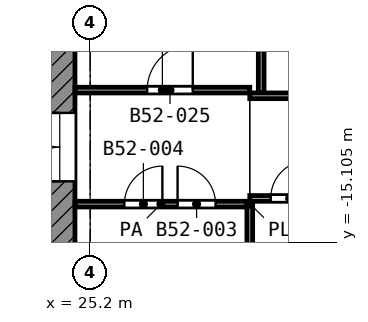
"""IFC4 building model, lengths in metres.
Left out: names, types, materials, properties, quantities, classifications, styles, units other than length and angle.
Written with IfcOpenShell. Run it as: python <this file> out.ifc"""

import sys

from ifc_helpers import new_model, si_unit, direction, frame, frame_2d, origin, place, context, subcontext, project, spatial, rectangle, extrude, element, fill, save


model = new_model("IFC4")
c1 = context("Model", 3, precision=1e-05, world=origin(), true_north=direction((0.0, 1.0)))
c2 = subcontext(c1, "Body", "Model", "MODEL_VIEW")
j1 = project(units=[si_unit("LENGTHUNIT", "METRE"), si_unit("PLANEANGLEUNIT", "RADIAN")], contexts=[c1])
p1 = place(None, origin())
s1 = spatial("IfcSite", under=j1, at=p1, CompositionType="ELEMENT")
p2 = place(p1, origin())
s2 = spatial("IfcBuilding", under=s1, at=p2, CompositionType="ELEMENT")
p3 = place(p2, frame((0.0, 0.0, 226.4)))
s3 = spatial("IfcBuildingStorey", under=s2, at=p3, CompositionType="ELEMENT", Elevation=226.4)
p4 = place(p3, frame((24.4, -24.0, 0.0), z_axis=(0.0, 0.0, 1.0), x_axis=(0.0, 1.0, 0.0)))
e1 = element("IfcWall", 1, at=p4, inside=s3, PredefinedType="SHEAR", context=c2, shape_type="SweptSolid", body=[
    extrude(rectangle(XDim=18.6, YDim=0.8, at=frame_2d((9.3, 0.0))), origin(), (0.0, 0.0, 1.0), 3.6),
])
p5 = place(p4, frame((10.5, 0.0, 0.0)))
e2 = element("IfcOpeningElement", 2, at=p5, cuts=e1, PredefinedType="OPENING", context=c2, shape_type="SweptSolid", body=[
    extrude(rectangle(XDim=1.8, YDim=2.1, at=frame_2d((0.9, 1.05))), frame((0.0, 0.41, 0.0), z_axis=(0.0, -1.0, 0.0), x_axis=(1.0, 0.0, 0.0)), (0.0, 0.0, 1.0), 0.82),
])
p6 = place(p3, frame((29.4, -14.147, 0.0), z_axis=(0.0, 0.0, 1.0), x_axis=(0.0, 1.0, 0.0)))
e3 = element("IfcWall", 3, at=p6, inside=s3, PredefinedType="PARTITIONING", context=c2, shape_type="SweptSolid", body=[
    extrude(rectangle(XDim=0.12, YDim=0.1, at=frame_2d((0.06, 0.0))), origin(), (0.0, 0.0, 1.0), 3.6),
])
p7 = place(p3, frame((24.8, -14.1, 0.0), z_axis=(0.0, 0.0, 1.0), x_axis=(1.0, 0.0, 0.0)))
e4 = element("IfcWall", 4, at=p7, inside=s3, PredefinedType="PARTITIONING", context=c2, shape_type="SweptSolid", body=[
    extrude(rectangle(XDim=4.525, YDim=0.15, at=frame_2d((2.262, 0.0))), origin(), (0.0, 0.0, 1.0), 3.6),
])
p8 = place(p7, frame((2.7, 0.0, 0.0)))
e5 = element("IfcOpeningElement", 5, at=p8, cuts=e4, PredefinedType="OPENING", context=c2, shape_type="SweptSolid", body=[
    extrude(rectangle(XDim=1.0, YDim=2.1, at=frame_2d((0.5, 1.05))), frame((0.0, 0.085, 0.0), z_axis=(0.0, -1.0, 0.0), x_axis=(1.0, 0.0, 0.0)), (0.0, 0.0, 1.0), 0.17),
])
p9 = place(p7, frame((1.3, 0.0, 0.0)))
e6 = element("IfcOpeningElement", 6, at=p9, cuts=e4, PredefinedType="OPENING", context=c2, shape_type="SweptSolid", body=[
    extrude(rectangle(XDim=1.0, YDim=2.1, at=frame_2d((0.5, 1.05))), frame((0.0, 0.085, 0.0), z_axis=(0.0, -1.0, 0.0), x_axis=(1.0, 0.0, 0.0)), (0.0, 0.0, 1.0), 0.17),
])
p10 = place(p3, frame((29.4, -13.95, 0.0), z_axis=(0.0, 0.0, 1.0), x_axis=(1.0, 0.0, 0.0)))
e7 = element("IfcWall", 7, at=p10, inside=s3, PredefinedType="PARTITIONING", context=c2, shape_type="SweptSolid", body=[
    extrude(rectangle(XDim=37.72, YDim=0.15, at=frame_2d((18.86, 0.0))), origin(), (0.0, 0.0, 1.0), 2.7),
])
p11 = place(p10, frame((20.65, 0.0, 0.0)))
e8 = element("IfcOpeningElement", 8, at=p11, cuts=e7, PredefinedType="OPENING", context=c2, shape_type="SweptSolid", body=[
    extrude(rectangle(XDim=1.0, YDim=2.1, at=frame_2d((0.5, 1.05))), frame((0.0, 0.085, 0.0), z_axis=(0.0, -1.0, 0.0), x_axis=(1.0, 0.0, 0.0)), (0.0, 0.0, 1.0), 0.17),
])
p12 = place(p10, frame((26.65, 0.0, 0.0)))
e9 = element("IfcOpeningElement", 9, at=p12, cuts=e7, PredefinedType="OPENING", context=c2, shape_type="SweptSolid", body=[
    extrude(rectangle(XDim=1.0, YDim=2.1, at=frame_2d((0.5, 1.05))), frame((0.0, 0.085, 0.0), z_axis=(0.0, -1.0, 0.0), x_axis=(1.0, 0.0, 0.0)), (0.0, 0.0, 1.0), 0.17),
])
p13 = place(p10, frame((34.5, 0.0, 0.0)))
e10 = element("IfcOpeningElement", 10, at=p13, cuts=e7, PredefinedType="OPENING", context=c2, shape_type="SweptSolid", body=[
    extrude(rectangle(XDim=1.0, YDim=2.1, at=frame_2d((0.5, 1.05))), frame((0.0, 0.085, 0.0), z_axis=(0.0, -1.0, 0.0), x_axis=(1.0, 0.0, 0.0)), (0.0, 0.0, 1.0), 0.17),
])
p14 = place(p10, frame((31.7, 0.0, 0.0)))
e11 = element("IfcOpeningElement", 11, at=p14, cuts=e7, PredefinedType="OPENING", context=c2, shape_type="SweptSolid", body=[
    extrude(rectangle(XDim=1.0, YDim=2.1, at=frame_2d((0.5, 1.05))), frame((0.0, 0.085, 0.0), z_axis=(0.0, -1.0, 0.0), x_axis=(1.0, 0.0, 0.0)), (0.0, 0.0, 1.0), 0.17),
])
p15 = place(p10, frame((0.55, 0.0, 0.0)))
e12 = element("IfcOpeningElement", 12, at=p15, cuts=e7, PredefinedType="OPENING", context=c2, shape_type="SweptSolid", body=[
    extrude(rectangle(XDim=1.0, YDim=2.1, at=frame_2d((0.5, 1.05))), frame((0.0, 0.085, 0.0), z_axis=(0.0, -1.0, 0.0), x_axis=(1.0, 0.0, 0.0)), (0.0, 0.0, 1.0), 0.17),
])
p16 = place(p10, frame((9.25, 0.0, 0.0)))
e13 = element("IfcOpeningElement", 13, at=p16, cuts=e7, PredefinedType="OPENING", context=c2, shape_type="SweptSolid", body=[
    extrude(rectangle(XDim=1.0, YDim=2.1, at=frame_2d((0.5, 1.05))), frame((0.0, 0.085, 0.0), z_axis=(0.0, -1.0, 0.0), x_axis=(1.0, 0.0, 0.0)), (0.0, 0.0, 1.0), 0.17),
])
p17 = place(p3, frame((29.4, -11.25, 0.0), z_axis=(0.0, 0.0, 1.0), x_axis=(1.0, 0.0, 0.0)))
e14 = element("IfcWall", 14, at=p17, inside=s3, PredefinedType="PARTITIONING", context=c2, shape_type="SweptSolid", body=[
    extrude(rectangle(XDim=10.832, YDim=0.15, at=frame_2d((5.416, 0.0))), origin(), (0.0, 0.0, 1.0), 3.6),
])
p18 = place(p17, frame((1.75, 0.0, 0.0)))
e15 = element("IfcOpeningElement", 15, at=p18, cuts=e14, PredefinedType="OPENING", context=c2, shape_type="SweptSolid", body=[
    extrude(rectangle(XDim=1.0, YDim=2.1, at=frame_2d((0.5, 1.05))), frame((0.0, 0.085, 0.0), z_axis=(0.0, -1.0, 0.0), x_axis=(1.0, 0.0, 0.0)), (0.0, 0.0, 1.0), 0.17),
])
p19 = place(p17, frame((5.5, 0.0, 0.0)))
e16 = element("IfcOpeningElement", 16, at=p19, cuts=e14, PredefinedType="OPENING", context=c2, shape_type="SweptSolid", body=[
    extrude(rectangle(XDim=1.0, YDim=2.1, at=frame_2d((0.5, 1.05))), frame((0.0, 0.085, 0.0), z_axis=(0.0, -1.0, 0.0), x_axis=(1.0, 0.0, 0.0)), (0.0, 0.0, 1.0), 0.17),
])
p20 = place(p3, frame((24.8, -11.1, 0.0), z_axis=(0.0, 0.0, 1.0), x_axis=(1.0, 0.0, 0.0)))
e17 = element("IfcWall", 17, at=p20, inside=s3, PredefinedType="PARTITIONING", context=c2, shape_type="SweptSolid", body=[
    extrude(rectangle(XDim=4.6, YDim=0.15, at=frame_2d((2.3, 0.0))), origin(), (0.0, 0.0, 1.0), 3.6),
])
p21 = place(p20, frame((1.9, 0.0, 0.0)))
e18 = element("IfcOpeningElement", 18, at=p21, cuts=e17, PredefinedType="OPENING", context=c2, shape_type="SweptSolid", body=[
    extrude(rectangle(XDim=1.2, YDim=2.1, at=frame_2d((0.6, 1.05))), frame((0.0, 0.085, 0.0), z_axis=(0.0, -1.0, 0.0), x_axis=(1.0, 0.0, 0.0)), (0.0, 0.0, 1.0), 0.17),
])
p22 = place(p3, frame((29.4, -25.2, 0.0), z_axis=(0.0, 0.0, 1.0), x_axis=(0.0, 1.0, 0.0)))
e19 = element("IfcWall", 19, at=p22, inside=s3, PredefinedType="PARTITIONING", context=c2, shape_type="SweptSolid", body=[
    extrude(rectangle(XDim=11.1, YDim=0.15, at=frame_2d((5.55, 0.0))), origin(), (0.0, 0.0, 1.0), 3.6),
])
p23 = place(p3, frame((29.7, -11.175, 0.0), z_axis=(0.0, 0.0, 1.0), x_axis=(0.0, 1.0, 0.0)))
e20 = element("IfcWall", 20, at=p23, inside=s3, PredefinedType="PARTITIONING", context=c2, shape_type="SweptSolid", body=[
    extrude(rectangle(XDim=11.095, YDim=0.15, at=frame_2d((5.547, 0.0))), origin(), (0.0, 0.0, 1.0), 3.6),
])
p24 = place(p5, origin())
e21 = element("IfcDoor", 21, at=p24, inside=s3, OperationType="DOUBLE_DOOR_SINGLE_SWING", PredefinedType="DOOR", context=c2, shape_type="SweptSolid", body=[
    extrude(rectangle(XDim=1.8, YDim=2.1, at=frame_2d((0.9, 1.05))), frame((0.0, 0.025, 0.0), z_axis=(0.0, -1.0, 0.0), x_axis=(1.0, 0.0, 0.0)), (0.0, 0.0, 1.0), 0.05),
])
fill(e2, e21)
p25 = place(p8, origin())
e22 = element("IfcDoor", 22, at=p25, inside=s3, OperationType="SINGLE_SWING_LEFT", PredefinedType="DOOR", context=c2, shape_type="SweptSolid", body=[
    extrude(rectangle(XDim=1.0, YDim=2.1, at=frame_2d((0.5, 1.05))), frame((0.0, 0.025, 0.0), z_axis=(0.0, -1.0, 0.0), x_axis=(1.0, 0.0, 0.0)), (0.0, 0.0, 1.0), 0.05),
])
fill(e5, e22)
p26 = place(p9, origin())
e23 = element("IfcDoor", 23, at=p26, inside=s3, OperationType="SINGLE_SWING_RIGHT", PredefinedType="DOOR", context=c2, shape_type="SweptSolid", body=[
    extrude(rectangle(XDim=1.0, YDim=2.1, at=frame_2d((0.5, 1.05))), frame((0.0, 0.025, 0.0), z_axis=(0.0, -1.0, 0.0), x_axis=(1.0, 0.0, 0.0)), (0.0, 0.0, 1.0), 0.05),
])
fill(e6, e23)
p27 = place(p21, origin())
e24 = element("IfcDoor", 24, at=p27, inside=s3, OperationType="SINGLE_SWING_RIGHT", PredefinedType="DOOR", context=c2, shape_type="SweptSolid", body=[
    extrude(rectangle(XDim=1.2, YDim=2.1, at=frame_2d((0.6, 1.05))), frame((0.0, 0.025, 0.0), z_axis=(0.0, -1.0, 0.0), x_axis=(1.0, 0.0, 0.0)), (0.0, 0.0, 1.0), 0.05),
])
fill(e18, e24)
p28 = place(p15, origin())
e25 = element("IfcDoor", 25, at=p28, inside=s3, OperationType="SINGLE_SWING_RIGHT", PredefinedType="DOOR", context=c2, shape_type="SweptSolid", body=[
    extrude(rectangle(XDim=1.0, YDim=2.1, at=frame_2d((0.5, 1.05))), frame((0.0, 0.025, 0.0), z_axis=(0.0, -1.0, 0.0), x_axis=(1.0, 0.0, 0.0)), (0.0, 0.0, 1.0), 0.05),
])
fill(e12, e25)
save(model, sys.argv[1])
